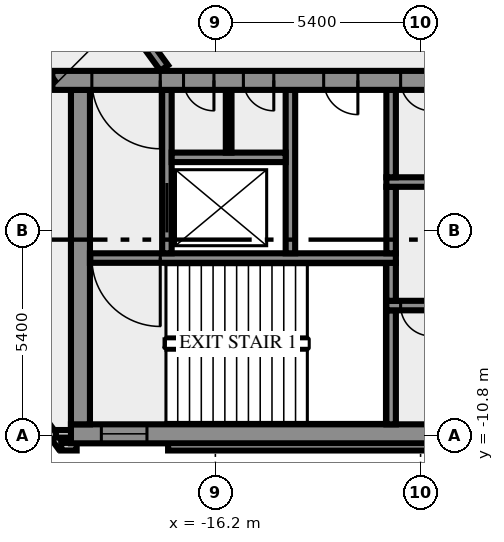
"""IFC4 building model, lengths in metres.
Left out: names, types, materials, properties, quantities, classifications, styles, units other than length and angle.
Written with IfcOpenShell. Run it as: python <this file> out.ifc"""

import sys

from ifc_helpers import new_model, si_unit, direction, frame, frame_2d, origin, place, context, subcontext, project, spatial, rectangle, extrude, element, fill, save


model = new_model("IFC4")
c1 = context("Model", 3, precision=1e-05, world=origin(), true_north=direction((0.0, 1.0)))
c2 = subcontext(c1, "Body", "Model", "MODEL_VIEW")
j1 = project(units=[si_unit("LENGTHUNIT", "METRE"), si_unit("PLANEANGLEUNIT", "RADIAN")], contexts=[c1])
p1 = place(None, origin())
s1 = spatial("IfcSite", under=j1, at=p1, CompositionType="ELEMENT")
p2 = place(p1, origin())
s2 = spatial("IfcBuilding", under=s1, at=p2, CompositionType="ELEMENT")
p3 = place(p2, frame((0.0, 0.0, 347.0)))
s3 = spatial("IfcBuildingStorey", under=s2, at=p3, CompositionType="ELEMENT", Elevation=347.0)
p4 = place(p3, frame((-21.833, -8.909, 0.0), z_axis=(0.0, 0.0, 1.0), x_axis=(0.587766567315, -0.809030569476, 0.0)))
e1 = element("IfcWall", 1, at=p4, inside=s3, PredefinedType="SOLIDWALL", context=c2, shape_type="SweptSolid", body=[
    extrude(rectangle(XDim=2.688, YDim=0.2, at=frame_2d((1.344, 0.0))), origin(), (0.0, 0.0, 1.0), 3.65),
])
p5 = place(p3, frame((-20.256, -11.088, 0.0), z_axis=(0.0, 0.0, 1.0), x_axis=(1.0, 0.0, 0.0)))
e2 = element("IfcWall", 2, at=p5, inside=s3, PredefinedType="SOLIDWALL", context=c2, shape_type="SweptSolid", body=[
    extrude(rectangle(XDim=0.406, YDim=0.2, at=frame_2d((0.203, 0.0))), origin(), (0.0, 0.0, 1.0), 3.65),
])
p6 = place(p3, frame((-17.444, -11.088, 0.0), z_axis=(0.0, 0.0, 1.0), x_axis=(1.0, 0.0, 0.0)))
e3 = element("IfcWall", 3, at=p6, inside=s3, PredefinedType="SOLIDWALL", context=c2, shape_type="SweptSolid", body=[
    extrude(rectangle(XDim=34.888, YDim=0.2, at=frame_2d((17.444, 0.0))), origin(), (0.0, 0.0, 1.0), 3.65),
])
p7 = place(p3, frame((-19.98, -10.75, 0.0), z_axis=(0.0, 0.0, 1.0), x_axis=(-1.0, 0.0, 0.0)))
e4 = element("IfcWall", 4, at=p7, inside=s3, PredefinedType="SOLIDWALL", context=c2, shape_type="SweptSolid", body=[
    extrude(rectangle(XDim=0.417, YDim=0.2, at=frame_2d((0.208, 0.0))), origin(), (0.0, 0.0, 1.0), 3.65),
])
p8 = place(p3, frame((-20.0, -10.75, 0.0), z_axis=(0.0, 0.0, 1.0), x_axis=(1.0, 0.0, 0.0)))
e5 = element("IfcWall", 5, at=p8, inside=s3, PredefinedType="SHEAR", context=c2, shape_type="SweptSolid", body=[
    extrude(rectangle(XDim=40.0, YDim=0.5, at=frame_2d((20.0, 0.0))), origin(), (0.0, 0.0, 1.0), 3.65),
])
p9 = place(p8, frame((0.8, 0.0, 1.0)))
e6 = element("IfcOpeningElement", 6, at=p9, cuts=e5, PredefinedType="OPENING", context=c2, shape_type="SweptSolid", body=[
    extrude(rectangle(XDim=1.2, YDim=1.2, at=frame_2d((0.6, 0.6))), frame((0.0, 0.26, 0.0), z_axis=(0.0, -1.0, 0.0), x_axis=(1.0, 0.0, 0.0)), (0.0, 0.0, 1.0), 0.52),
])
p10 = place(p8, frame((38.0, 0.0, 1.0)))
e7 = element("IfcOpeningElement", 7, at=p10, cuts=e5, PredefinedType="OPENING", context=c2, shape_type="SweptSolid", body=[
    extrude(rectangle(XDim=1.2, YDim=1.2, at=frame_2d((0.6, 0.6))), frame((0.0, 0.26, 0.0), z_axis=(0.0, -1.0, 0.0), x_axis=(1.0, 0.0, 0.0)), (0.0, 0.0, 1.0), 0.52),
])
p11 = place(p3, frame((-19.75, -10.5, 0.0), z_axis=(0.0, 0.0, 1.0), x_axis=(0.0, 1.0, 0.0)))
e8 = element("IfcWall", 8, at=p11, inside=s3, PredefinedType="SHEAR", context=c2, shape_type="SweptSolid", body=[
    extrude(rectangle(XDim=8.8, YDim=0.5, at=frame_2d((4.4, 0.0))), origin(), (0.0, 0.0, 1.0), 3.65),
])
p12 = place(p3, frame((-11.575, -10.5, 0.0), z_axis=(0.0, 0.0, 1.0), x_axis=(0.0, 1.0, 0.0)))
e9 = element("IfcWall", 9, at=p12, inside=s3, PredefinedType="SHEAR", context=c2, shape_type="SweptSolid", body=[
    extrude(rectangle(XDim=3.0, YDim=0.25, at=frame_2d((1.5, 0.0))), origin(), (0.0, 0.0, 1.0), 3.65),
])
p13 = place(p3, frame((11.7, -7.375, 0.0), z_axis=(0.0, 0.0, 1.0), x_axis=(-1.0, 0.0, 0.0)))
e10 = element("IfcWall", 10, at=p13, inside=s3, PredefinedType="SHEAR", context=c2, shape_type="SweptSolid", body=[
    extrude(rectangle(XDim=23.4, YDim=0.25, at=frame_2d((11.7, 0.0))), origin(), (0.0, 0.0, 1.0), 3.65),
])
p14 = place(p13, frame((22.225, 0.0, 0.0)))
e11 = element("IfcOpeningElement", 11, at=p14, cuts=e10, PredefinedType="OPENING", context=c2, shape_type="SweptSolid", body=[
    extrude(rectangle(XDim=0.8, YDim=2.1, at=frame_2d((0.4, 1.05))), frame((0.0, 0.135, 0.0), z_axis=(0.0, -1.0, 0.0), x_axis=(1.0, 0.0, 0.0)), (0.0, 0.0, 1.0), 0.27),
])
p15 = place(p13, frame((20.2, 0.0, 0.0)))
e12 = element("IfcOpeningElement", 12, at=p15, cuts=e10, PredefinedType="OPENING", context=c2, shape_type="SweptSolid", body=[
    extrude(rectangle(XDim=1.1, YDim=2.1, at=frame_2d((0.55, 1.05))), frame((0.0, 0.135, 0.0), z_axis=(0.0, -1.0, 0.0), x_axis=(1.0, 0.0, 0.0)), (0.0, 0.0, 1.0), 0.27),
])
p16 = place(p13, frame((17.7, 0.0, 0.0)))
e13 = element("IfcOpeningElement", 13, at=p16, cuts=e10, PredefinedType="OPENING", context=c2, shape_type="SweptSolid", body=[
    extrude(rectangle(XDim=1.1, YDim=2.1, at=frame_2d((0.55, 1.05))), frame((0.0, 0.135, 0.0), z_axis=(0.0, -1.0, 0.0), x_axis=(1.0, 0.0, 0.0)), (0.0, 0.0, 1.0), 0.27),
])
p17 = place(p13, frame((15.975, 0.0, 0.0)))
e14 = element("IfcOpeningElement", 14, at=p17, cuts=e10, PredefinedType="OPENING", context=c2, shape_type="SweptSolid", body=[
    extrude(rectangle(XDim=0.8, YDim=2.1, at=frame_2d((0.4, 1.05))), frame((0.0, 0.135, 0.0), z_axis=(0.0, -1.0, 0.0), x_axis=(1.0, 0.0, 0.0)), (0.0, 0.0, 1.0), 0.27),
])
p18 = place(p13, frame((14.65, 0.0, 0.0)))
e15 = element("IfcOpeningElement", 15, at=p18, cuts=e10, PredefinedType="OPENING", context=c2, shape_type="SweptSolid", body=[
    extrude(rectangle(XDim=0.8, YDim=2.1, at=frame_2d((0.4, 1.05))), frame((0.0, 0.135, 0.0), z_axis=(0.0, -1.0, 0.0), x_axis=(1.0, 0.0, 0.0)), (0.0, 0.0, 1.0), 0.27),
])
p19 = place(p13, frame((12.8, 0.0, 0.0)))
e16 = element("IfcOpeningElement", 16, at=p19, cuts=e10, PredefinedType="OPENING", context=c2, shape_type="SweptSolid", body=[
    extrude(rectangle(XDim=0.9, YDim=2.1, at=frame_2d((0.45, 1.05))), frame((0.0, 0.135, 0.0), z_axis=(0.0, -1.0, 0.0), x_axis=(1.0, 0.0, 0.0)), (0.0, 0.0, 1.0), 0.27),
])
p20 = place(p13, frame((10.7, 0.0, 0.0)))
e17 = element("IfcOpeningElement", 17, at=p20, cuts=e10, PredefinedType="OPENING", context=c2, shape_type="SweptSolid", body=[
    extrude(rectangle(XDim=0.9, YDim=2.1, at=frame_2d((0.45, 1.05))), frame((0.0, 0.135, 0.0), z_axis=(0.0, -1.0, 0.0), x_axis=(1.0, 0.0, 0.0)), (0.0, 0.0, 1.0), 0.27),
])
p21 = place(p13, frame((4.7, 0.0, 0.0)))
e18 = element("IfcOpeningElement", 18, at=p21, cuts=e10, PredefinedType="OPENING", context=c2, shape_type="SweptSolid", body=[
    extrude(rectangle(XDim=0.9, YDim=2.1, at=frame_2d((0.45, 1.05))), frame((0.0, 0.135, 0.0), z_axis=(0.0, -1.0, 0.0), x_axis=(1.0, 0.0, 0.0)), (0.0, 0.0, 1.0), 0.27),
])
p22 = place(p3, frame((-11.575, -7.25, 0.0), z_axis=(0.0, 0.0, 1.0), x_axis=(0.0, 1.0, 0.0)))
e19 = element("IfcWall", 19, at=p22, inside=s3, PredefinedType="SHEAR", context=c2, shape_type="SweptSolid", body=[
    extrude(rectangle(XDim=1.0, YDim=0.25, at=frame_2d((0.5, 0.0))), origin(), (0.0, 0.0, 1.0), 3.65),
])
p23 = place(p3, frame((-11.45, -6.125, 0.0), z_axis=(0.0, 0.0, 1.0), x_axis=(-1.0, 0.0, 0.0)))
e20 = element("IfcWall", 20, at=p23, inside=s3, PredefinedType="SHEAR", context=c2, shape_type="SweptSolid", body=[
    extrude(rectangle(XDim=8.05, YDim=0.25, at=frame_2d((4.025, 0.0))), origin(), (0.0, 0.0, 1.0), 3.65),
])
p24 = place(p23, frame((6.2, 0.0, 0.0)))
e21 = element("IfcOpeningElement", 21, at=p24, cuts=e20, PredefinedType="OPENING", context=c2, shape_type="SweptSolid", body=[
    extrude(rectangle(XDim=1.8, YDim=2.1, at=frame_2d((0.9, 1.05))), frame((0.0, 0.135, 0.0), z_axis=(0.0, -1.0, 0.0), x_axis=(1.0, 0.0, 0.0)), (0.0, 0.0, 1.0), 0.27),
])
p25 = place(p3, frame((-17.475, -6.0, 0.0), z_axis=(0.0, 0.0, 1.0), x_axis=(0.0, 1.0, 0.0)))
e22 = element("IfcWall", 22, at=p25, inside=s3, PredefinedType="SHEAR", context=c2, shape_type="SweptSolid", body=[
    extrude(rectangle(XDim=4.3, YDim=0.25, at=frame_2d((2.15, 0.0))), origin(), (0.0, 0.0, 1.0), 3.65),
])
p26 = place(p25, frame((0.55, 0.0, 0.0)))
e23 = element("IfcOpeningElement", 23, at=p26, cuts=e22, PredefinedType="OPENING", context=c2, shape_type="SweptSolid", body=[
    extrude(rectangle(XDim=1.3, YDim=2.1, at=frame_2d((0.65, 1.05))), frame((0.0, 0.135, 0.0), z_axis=(0.0, -1.0, 0.0), x_axis=(1.0, 0.0, 0.0)), (0.0, 0.0, 1.0), 0.27),
])
p27 = place(p3, frame((-14.225, -6.0, 0.0), z_axis=(0.0, 0.0, 1.0), x_axis=(0.0, 1.0, 0.0)))
e24 = element("IfcWall", 24, at=p27, inside=s3, PredefinedType="SHEAR", context=c2, shape_type="SweptSolid", body=[
    extrude(rectangle(XDim=4.3, YDim=0.25, at=frame_2d((2.15, 0.0))), origin(), (0.0, 0.0, 1.0), 3.65),
])
p28 = place(p3, frame((-11.575, -6.0, 0.0), z_axis=(0.0, 0.0, 1.0), x_axis=(0.0, 1.0, 0.0)))
e25 = element("IfcWall", 25, at=p28, inside=s3, PredefinedType="SHEAR", context=c2, shape_type="SweptSolid", body=[
    extrude(rectangle(XDim=1.75, YDim=0.25, at=frame_2d((0.875, 0.0))), origin(), (0.0, 0.0, 1.0), 3.65),
])
p29 = place(p3, frame((-11.7, -4.125, 0.0), z_axis=(0.0, 0.0, 1.0), x_axis=(1.0, 0.0, 0.0)))
e26 = element("IfcWall", 26, at=p29, inside=s3, PredefinedType="SHEAR", context=c2, shape_type="SweptSolid", body=[
    extrude(rectangle(XDim=7.75, YDim=0.25, at=frame_2d((3.875, 0.0))), origin(), (0.0, 0.0, 1.0), 3.65),
])
p30 = place(p29, frame((2.1, 0.0, 0.0)))
e27 = element("IfcOpeningElement", 27, at=p30, cuts=e26, PredefinedType="OPENING", context=c2, shape_type="SweptSolid", body=[
    extrude(rectangle(XDim=1.1, YDim=2.1, at=frame_2d((0.55, 1.05))), frame((0.0, 0.135, 0.0), z_axis=(0.0, -1.0, 0.0), x_axis=(1.0, 0.0, 0.0)), (0.0, 0.0, 1.0), 0.27),
])
p31 = place(p29, frame((4.6, 0.0, 0.0)))
e28 = element("IfcOpeningElement", 28, at=p31, cuts=e26, PredefinedType="OPENING", context=c2, shape_type="SweptSolid", body=[
    extrude(rectangle(XDim=1.1, YDim=2.1, at=frame_2d((0.55, 1.05))), frame((0.0, 0.135, 0.0), z_axis=(0.0, -1.0, 0.0), x_axis=(1.0, 0.0, 0.0)), (0.0, 0.0, 1.0), 0.27),
])
p32 = place(p3, frame((-11.575, -4.0, 0.0), z_axis=(0.0, 0.0, 1.0), x_axis=(0.0, 1.0, 0.0)))
e29 = element("IfcWall", 29, at=p32, inside=s3, PredefinedType="SHEAR", context=c2, shape_type="SweptSolid", body=[
    extrude(rectangle(XDim=2.3, YDim=0.25, at=frame_2d((1.15, 0.0))), origin(), (0.0, 0.0, 1.0), 3.65),
])
p33 = place(p3, frame((-17.35, -3.475, 0.0), z_axis=(0.0, 0.0, 1.0), x_axis=(1.0, 0.0, 0.0)))
e30 = element("IfcWall", 30, at=p33, inside=s3, PredefinedType="SHEAR", context=c2, shape_type="SweptSolid", body=[
    extrude(rectangle(XDim=3.0, YDim=0.25, at=frame_2d((1.5, 0.0))), origin(), (0.0, 0.0, 1.0), 3.65),
])
p34 = place(p3, frame((-15.85, -3.35, 0.0), z_axis=(0.0, 0.0, 1.0), x_axis=(0.0, 1.0, 0.0)))
e31 = element("IfcWall", 31, at=p34, inside=s3, PredefinedType="PARTITIONING", context=c2, shape_type="SweptSolid", body=[
    extrude(rectangle(XDim=1.65, YDim=0.15, at=frame_2d((0.825, 0.0))), origin(), (0.0, 0.0, 1.0), 3.65),
])
p35 = place(p3, frame((20.49, -1.45, 0.0), z_axis=(0.0, 0.0, 1.0), x_axis=(-1.0, 0.0, 0.0)))
e32 = element("IfcWall", 32, at=p35, inside=s3, PredefinedType="SHEAR", context=c2, shape_type="SweptSolid", body=[
    extrude(rectangle(XDim=40.98, YDim=0.5, at=frame_2d((20.49, 0.0))), origin(), (0.0, 0.0, 1.0), 3.65),
])
p36 = place(p35, frame((38.14, 0.0, 0.0)))
e33 = element("IfcOpeningElement", 33, at=p36, cuts=e32, PredefinedType="OPENING", context=c2, shape_type="SweptSolid", body=[
    extrude(rectangle(XDim=1.8, YDim=2.1, at=frame_2d((0.9, 1.05))), frame((0.0, 0.26, 0.0), z_axis=(0.0, -1.0, 0.0), x_axis=(1.0, 0.0, 0.0)), (0.0, 0.0, 1.0), 0.52),
])
p37 = place(p35, frame((36.728, 0.0, 0.0)))
e34 = element("IfcOpeningElement", 34, at=p37, cuts=e32, PredefinedType="OPENING", context=c2, shape_type="SweptSolid", body=[
    extrude(rectangle(XDim=0.8, YDim=2.1, at=frame_2d((0.4, 1.05))), frame((0.0, 0.26, 0.0), z_axis=(0.0, -1.0, 0.0), x_axis=(1.0, 0.0, 0.0)), (0.0, 0.0, 1.0), 0.52),
])
p38 = place(p35, frame((35.153, 0.0, 0.0)))
e35 = element("IfcOpeningElement", 35, at=p38, cuts=e32, PredefinedType="OPENING", context=c2, shape_type="SweptSolid", body=[
    extrude(rectangle(XDim=0.8, YDim=2.1, at=frame_2d((0.4, 1.05))), frame((0.0, 0.26, 0.0), z_axis=(0.0, -1.0, 0.0), x_axis=(1.0, 0.0, 0.0)), (0.0, 0.0, 1.0), 0.52),
])
p39 = place(p35, frame((32.94, 0.0, 0.0)))
e36 = element("IfcOpeningElement", 36, at=p39, cuts=e32, PredefinedType="OPENING", context=c2, shape_type="SweptSolid", body=[
    extrude(rectangle(XDim=0.9, YDim=2.1, at=frame_2d((0.45, 1.05))), frame((0.0, 0.26, 0.0), z_axis=(0.0, -1.0, 0.0), x_axis=(1.0, 0.0, 0.0)), (0.0, 0.0, 1.0), 0.52),
])
p40 = place(p35, frame((31.015, 0.0, 0.0)))
e37 = element("IfcOpeningElement", 37, at=p40, cuts=e32, PredefinedType="OPENING", context=c2, shape_type="SweptSolid", body=[
    extrude(rectangle(XDim=0.8, YDim=2.1, at=frame_2d((0.4, 1.05))), frame((0.0, 0.26, 0.0), z_axis=(0.0, -1.0, 0.0), x_axis=(1.0, 0.0, 0.0)), (0.0, 0.0, 1.0), 0.52),
])
p41 = place(p35, frame((24.765, 0.0, 0.0)))
e38 = element("IfcOpeningElement", 38, at=p41, cuts=e32, PredefinedType="OPENING", context=c2, shape_type="SweptSolid", body=[
    extrude(rectangle(XDim=0.8, YDim=2.1, at=frame_2d((0.4, 1.05))), frame((0.0, 0.26, 0.0), z_axis=(0.0, -1.0, 0.0), x_axis=(1.0, 0.0, 0.0)), (0.0, 0.0, 1.0), 0.52),
])
p42 = place(p35, frame((21.765, 0.0, 0.0)))
e39 = element("IfcOpeningElement", 39, at=p42, cuts=e32, PredefinedType="OPENING", context=c2, shape_type="SweptSolid", body=[
    extrude(rectangle(XDim=2.0, YDim=2.1, at=frame_2d((1.0, 1.05))), frame((0.0, 0.26, 0.0), z_axis=(0.0, -1.0, 0.0), x_axis=(1.0, 0.0, 0.0)), (0.0, 0.0, 1.0), 0.52),
])
p43 = place(p35, frame((14.002, 0.0, 0.0)))
e40 = element("IfcOpeningElement", 40, at=p43, cuts=e32, PredefinedType="OPENING", context=c2, shape_type="SweptSolid", body=[
    extrude(rectangle(XDim=0.9, YDim=2.1, at=frame_2d((0.45, 1.05))), frame((0.0, 0.26, 0.0), z_axis=(0.0, -1.0, 0.0), x_axis=(1.0, 0.0, 0.0)), (0.0, 0.0, 1.0), 0.52),
])
p44 = place(p35, frame((10.278, 0.0, 0.0)))
e41 = element("IfcOpeningElement", 41, at=p44, cuts=e32, PredefinedType="OPENING", context=c2, shape_type="SweptSolid", body=[
    extrude(rectangle(XDim=0.9, YDim=2.1, at=frame_2d((0.45, 1.05))), frame((0.0, 0.26, 0.0), z_axis=(0.0, -1.0, 0.0), x_axis=(1.0, 0.0, 0.0)), (0.0, 0.0, 1.0), 0.52),
])
p45 = place(p35, frame((7.14, 0.0, 0.0)))
e42 = element("IfcOpeningElement", 42, at=p45, cuts=e32, PredefinedType="OPENING", context=c2, shape_type="SweptSolid", body=[
    extrude(rectangle(XDim=0.9, YDim=2.1, at=frame_2d((0.45, 1.05))), frame((0.0, 0.26, 0.0), z_axis=(0.0, -1.0, 0.0), x_axis=(1.0, 0.0, 0.0)), (0.0, 0.0, 1.0), 0.52),
])
p46 = place(p35, frame((4.19, 0.0, 0.0)))
e43 = element("IfcOpeningElement", 43, at=p46, cuts=e32, PredefinedType="OPENING", context=c2, shape_type="SweptSolid", body=[
    extrude(rectangle(XDim=0.9, YDim=2.1, at=frame_2d((0.45, 1.05))), frame((0.0, 0.26, 0.0), z_axis=(0.0, -1.0, 0.0), x_axis=(1.0, 0.0, 0.0)), (0.0, 0.0, 1.0), 0.52),
])
p47 = place(p35, frame((1.04, 0.0, 0.0)))
e44 = element("IfcOpeningElement", 44, at=p47, cuts=e32, PredefinedType="OPENING", context=c2, shape_type="SweptSolid", body=[
    extrude(rectangle(XDim=1.8, YDim=2.1, at=frame_2d((0.9, 1.05))), frame((0.0, 0.26, 0.0), z_axis=(0.0, -1.0, 0.0), x_axis=(1.0, 0.0, 0.0)), (0.0, 0.0, 1.0), 0.52),
])
p48 = place(p3, frame((-20.531, -1.523, 0.0), z_axis=(0.0, 0.0, 1.0), x_axis=(-0.587785867777, 0.809016547199, 0.0)))
e45 = element("IfcWall", 45, at=p48, inside=s3, PredefinedType="SOLIDWALL", context=c2, shape_type="SweptSolid", body=[
    extrude(rectangle(XDim=16.67, YDim=0.25, at=frame_2d((8.335, 0.0))), origin(), (0.0, 0.0, 1.0), 3.65),
])
p49 = place(p48, frame((0.533, 0.0, 0.0)))
e46 = element("IfcOpeningElement", 46, at=p49, cuts=e45, PredefinedType="OPENING", context=c2, shape_type="SweptSolid", body=[
    extrude(rectangle(XDim=0.9, YDim=2.1, at=frame_2d((0.45, 1.05))), frame((0.0, 0.135, 0.0), z_axis=(0.0, -1.0, 0.0), x_axis=(1.0, 0.0, 0.0)), (0.0, 0.0, 1.0), 0.27),
])
p50 = place(p3, frame((-28.039, 13.319, 0.0), z_axis=(0.0, 0.0, 1.0), x_axis=(0.587791911753, -0.809012155952, 0.0)))
e47 = element("IfcWall", 47, at=p50, inside=s3, PredefinedType="SOLIDWALL", context=c2, shape_type="SweptSolid", body=[
    extrude(rectangle(XDim=17.853, YDim=0.25, at=frame_2d((8.927, 0.0))), origin(), (0.0, 0.0, 1.0), 3.65),
])
p51 = place(p50, frame((13.512, 0.0, 0.0)))
e48 = element("IfcOpeningElement", 48, at=p51, cuts=e47, PredefinedType="OPENING", context=c2, shape_type="SweptSolid", body=[
    extrude(rectangle(XDim=0.9, YDim=2.1, at=frame_2d((0.45, 1.05))), frame((0.0, 0.135, 0.0), z_axis=(0.0, -1.0, 0.0), x_axis=(1.0, 0.0, 0.0)), (0.0, 0.0, 1.0), 0.27),
])
p52 = place(p9, origin())
e49 = element("IfcWindow", 49, at=p52, inside=s3, PartitioningType="SINGLE_PANEL", PredefinedType="WINDOW", context=c2, shape_type="SweptSolid", body=[
    extrude(rectangle(XDim=1.2, YDim=1.2, at=frame_2d((0.6, 0.6))), frame((0.0, 0.03, 0.0), z_axis=(0.0, -1.0, 0.0), x_axis=(1.0, 0.0, 0.0)), (0.0, 0.0, 1.0), 0.06),
])
fill(e6, e49)
p53 = place(p14, origin())
e50 = element("IfcDoor", 50, at=p53, inside=s3, OperationType="SINGLE_SWING_RIGHT", PredefinedType="DOOR", context=c2, shape_type="SweptSolid", body=[
    extrude(rectangle(XDim=0.8, YDim=2.1, at=frame_2d((0.4, 1.05))), frame((0.0, 0.025, 0.0), z_axis=(0.0, -1.0, 0.0), x_axis=(1.0, 0.0, 0.0)), (0.0, 0.0, 1.0), 0.05),
])
fill(e11, e50)
p54 = place(p24, origin())
e51 = element("IfcDoor", 51, at=p54, inside=s3, OperationType="DOUBLE_DOOR_SINGLE_SWING", PredefinedType="DOOR", context=c2, shape_type="SweptSolid", body=[
    extrude(rectangle(XDim=1.8, YDim=2.1, at=frame_2d((0.9, 1.05))), frame((0.0, 0.025, 0.0), z_axis=(0.0, -1.0, 0.0), x_axis=(1.0, 0.0, 0.0)), (0.0, 0.0, 1.0), 0.05),
])
fill(e21, e51)
p55 = place(p26, origin())
e52 = element("IfcDoor", 52, at=p55, inside=s3, OperationType="DOUBLE_DOOR_SLIDING", PredefinedType="DOOR", context=c2, shape_type="SweptSolid", body=[
    extrude(rectangle(XDim=1.3, YDim=2.1, at=frame_2d((0.65, 1.05))), frame((0.0, 0.025, 0.0), z_axis=(0.0, -1.0, 0.0), x_axis=(1.0, 0.0, 0.0)), (0.0, 0.0, 1.0), 0.05),
])
fill(e23, e52)
p56 = place(p36, origin())
e53 = element("IfcDoor", 53, at=p56, inside=s3, OperationType="DOUBLE_DOOR_SINGLE_SWING", PredefinedType="DOOR", context=c2, shape_type="SweptSolid", body=[
    extrude(rectangle(XDim=1.8, YDim=2.1, at=frame_2d((0.9, 1.05))), frame((0.0, 0.025, 0.0), z_axis=(0.0, -1.0, 0.0), x_axis=(1.0, 0.0, 0.0)), (0.0, 0.0, 1.0), 0.05),
])
fill(e33, e53)
p57 = place(p37, origin())
e54 = element("IfcDoor", 54, at=p57, inside=s3, OperationType="SINGLE_SWING_RIGHT", PredefinedType="DOOR", context=c2, shape_type="SweptSolid", body=[
    extrude(rectangle(XDim=0.8, YDim=2.1, at=frame_2d((0.4, 1.05))), frame((0.0, 0.025, 0.0), z_axis=(0.0, -1.0, 0.0), x_axis=(1.0, 0.0, 0.0)), (0.0, 0.0, 1.0), 0.05),
])
fill(e34, e54)
p58 = place(p38, origin())
e55 = element("IfcDoor", 55, at=p58, inside=s3, OperationType="SINGLE_SWING_RIGHT", PredefinedType="DOOR", context=c2, shape_type="SweptSolid", body=[
    extrude(rectangle(XDim=0.8, YDim=2.1, at=frame_2d((0.4, 1.05))), frame((0.0, 0.025, 0.0), z_axis=(0.0, -1.0, 0.0), x_axis=(1.0, 0.0, 0.0)), (0.0, 0.0, 1.0), 0.05),
])
fill(e35, e55)
p59 = place(p39, origin())
e56 = element("IfcDoor", 56, at=p59, inside=s3, OperationType="SINGLE_SWING_RIGHT", PredefinedType="DOOR", context=c2, shape_type="SweptSolid", body=[
    extrude(rectangle(XDim=0.9, YDim=2.1, at=frame_2d((0.45, 1.05))), frame((0.0, 0.025, 0.0), z_axis=(0.0, -1.0, 0.0), x_axis=(1.0, 0.0, 0.0)), (0.0, 0.0, 1.0), 0.05),
])
fill(e36, e56)
p60 = place(p40, origin())
e57 = element("IfcDoor", 57, at=p60, inside=s3, OperationType="SINGLE_SWING_RIGHT", PredefinedType="DOOR", context=c2, shape_type="SweptSolid", body=[
    extrude(rectangle(XDim=0.8, YDim=2.1, at=frame_2d((0.4, 1.05))), frame((0.0, 0.025, 0.0), z_axis=(0.0, -1.0, 0.0), x_axis=(1.0, 0.0, 0.0)), (0.0, 0.0, 1.0), 0.05),
])
fill(e37, e57)
save(model, sys.argv[1])
